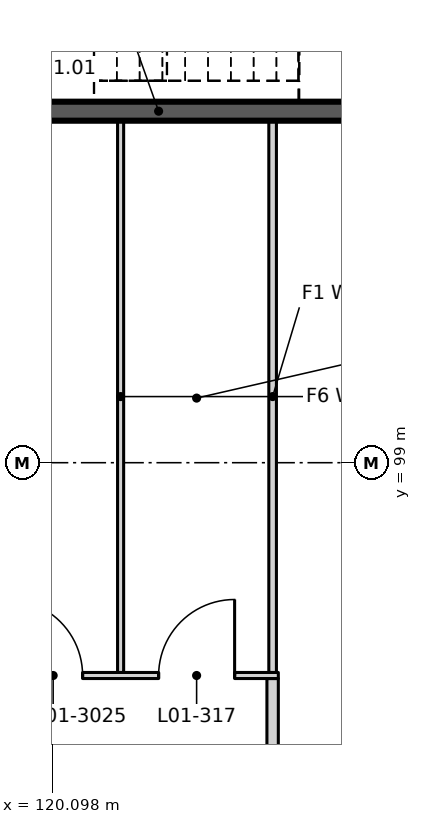
"""IFC4 building model, lengths in metres.
Left out: names, types, materials, properties, quantities, classifications, styles, units other than length and angle.
Written with IfcOpenShell. Run it as: python <this file> out.ifc"""

import sys

from ifc_helpers import new_model, si_unit, direction, frame, frame_2d, origin, place, context, subcontext, project, spatial, rectangle, extrude, element, fill, save


model = new_model("IFC4")
c1 = context("Model", 3, precision=1e-05, world=origin(), true_north=direction((0.0, 1.0)))
c2 = subcontext(c1, "Body", "Model", "MODEL_VIEW")
j1 = project(units=[si_unit("LENGTHUNIT", "METRE"), si_unit("PLANEANGLEUNIT", "RADIAN")], contexts=[c1])
p1 = place(None, origin())
s1 = spatial("IfcSite", under=j1, at=p1, CompositionType="ELEMENT")
p2 = place(p1, origin())
s2 = spatial("IfcBuilding", under=s1, at=p2, CompositionType="ELEMENT")
p3 = place(p2, frame((0.0, 0.0, 6.0)))
s3 = spatial("IfcBuildingStorey", under=s2, at=p3, CompositionType="ELEMENT", Elevation=6.0)
p4 = place(p3, frame((117.0, 103.625, 0.0), z_axis=(0.0, 0.0, 1.0), x_axis=(1.0, 0.0, 0.0)))
e1 = element("IfcWall", 1, at=p4, inside=s3, PredefinedType="SHEAR", context=c2, shape_type="SweptSolid", body=[
    extrude(rectangle(XDim=9.0, YDim=0.25, at=frame_2d((4.5, 0.0))), origin(), (0.0, 0.0, 1.0), 4.2),
])
p5 = place(p3, frame((123.0, 54.15, 0.0), z_axis=(0.0, 0.0, 1.0), x_axis=(0.0, 1.0, 0.0)))
e2 = element("IfcWall", 2, at=p5, inside=s3, PredefinedType="PARTITIONING", context=c2, shape_type="SweptSolid", body=[
    extrude(rectangle(XDim=42.01, YDim=0.15, at=frame_2d((21.005, 0.0))), origin(), (0.0, 0.0, 1.0), 3.65),
])
p6 = place(p5, frame((3.45, 0.0, 0.0)))
e3 = element("IfcOpeningElement", 3, at=p6, cuts=e2, PredefinedType="OPENING", context=c2, shape_type="SweptSolid", body=[
    extrude(rectangle(XDim=1.8, YDim=2.1, at=frame_2d((0.9, 1.05))), frame((0.0, 0.085, 0.0), z_axis=(0.0, -1.0, 0.0), x_axis=(1.0, 0.0, 0.0)), (0.0, 0.0, 1.0), 0.17),
])
p7 = place(p5, frame((12.45, 0.0, 0.0)))
e4 = element("IfcOpeningElement", 4, at=p7, cuts=e2, PredefinedType="OPENING", context=c2, shape_type="SweptSolid", body=[
    extrude(rectangle(XDim=1.8, YDim=2.1, at=frame_2d((0.9, 1.05))), frame((0.0, 0.085, 0.0), z_axis=(0.0, -1.0, 0.0), x_axis=(1.0, 0.0, 0.0)), (0.0, 0.0, 1.0), 0.17),
])
p8 = place(p5, frame((21.45, 0.0, 0.0)))
e5 = element("IfcOpeningElement", 5, at=p8, cuts=e2, PredefinedType="OPENING", context=c2, shape_type="SweptSolid", body=[
    extrude(rectangle(XDim=1.8, YDim=2.1, at=frame_2d((0.9, 1.05))), frame((0.0, 0.085, 0.0), z_axis=(0.0, -1.0, 0.0), x_axis=(1.0, 0.0, 0.0)), (0.0, 0.0, 1.0), 0.17),
])
p9 = place(p5, frame((30.45, 0.0, 0.0)))
e6 = element("IfcOpeningElement", 6, at=p9, cuts=e2, PredefinedType="OPENING", context=c2, shape_type="SweptSolid", body=[
    extrude(rectangle(XDim=1.8, YDim=2.1, at=frame_2d((0.9, 1.05))), frame((0.0, 0.085, 0.0), z_axis=(0.0, -1.0, 0.0), x_axis=(1.0, 0.0, 0.0)), (0.0, 0.0, 1.0), 0.17),
])
p10 = place(p5, frame((38.05, 0.0, 0.0)))
e7 = element("IfcOpeningElement", 7, at=p10, cuts=e2, PredefinedType="OPENING", context=c2, shape_type="SweptSolid", body=[
    extrude(rectangle(XDim=1.8, YDim=2.1, at=frame_2d((0.9, 1.05))), frame((0.0, 0.085, 0.0), z_axis=(0.0, -1.0, 0.0), x_axis=(1.0, 0.0, 0.0)), (0.0, 0.0, 1.0), 0.17),
])
p11 = place(p3, frame((117.15, 96.2, 0.0), z_axis=(0.0, 0.0, 1.0), x_axis=(1.0, 0.0, 0.0)))
e8 = element("IfcWall", 8, at=p11, inside=s3, PredefinedType="PARTITIONING", context=c2, shape_type="SweptSolid", body=[
    extrude(rectangle(XDim=5.925, YDim=0.08, at=frame_2d((2.962, 0.0))), origin(), (0.0, 0.0, 1.0), 3.65),
])
p12 = place(p11, frame((0.35, 0.0, 0.0)))
e9 = element("IfcOpeningElement", 9, at=p12, cuts=e8, PredefinedType="OPENING", context=c2, shape_type="SweptSolid", body=[
    extrude(rectangle(XDim=1.0, YDim=2.1, at=frame_2d((0.5, 1.05))), frame((0.0, 0.05, 0.0), z_axis=(0.0, -1.0, 0.0), x_axis=(1.0, 0.0, 0.0)), (0.0, 0.0, 1.0), 0.1),
])
p13 = place(p11, frame((2.35, 0.0, 0.0)))
e10 = element("IfcOpeningElement", 10, at=p13, cuts=e8, PredefinedType="OPENING", context=c2, shape_type="SweptSolid", body=[
    extrude(rectangle(XDim=1.0, YDim=2.1, at=frame_2d((0.5, 1.05))), frame((0.0, 0.05, 0.0), z_axis=(0.0, -1.0, 0.0), x_axis=(1.0, 0.0, 0.0)), (0.0, 0.0, 1.0), 0.1),
])
p14 = place(p11, frame((4.35, 0.0, 0.0)))
e11 = element("IfcOpeningElement", 11, at=p14, cuts=e8, PredefinedType="OPENING", context=c2, shape_type="SweptSolid", body=[
    extrude(rectangle(XDim=1.0, YDim=2.1, at=frame_2d((0.5, 1.05))), frame((0.0, 0.05, 0.0), z_axis=(0.0, -1.0, 0.0), x_axis=(1.0, 0.0, 0.0)), (0.0, 0.0, 1.0), 0.1),
])
p15 = place(p3, frame((121.0, 96.24, 0.0), z_axis=(0.0, 0.0, 1.0), x_axis=(0.0, 1.0, 0.0)))
e12 = element("IfcWall", 12, at=p15, inside=s3, PredefinedType="PARTITIONING", context=c2, shape_type="SweptSolid", body=[
    extrude(rectangle(XDim=7.26, YDim=0.08, at=frame_2d((3.63, 0.0))), origin(), (0.0, 0.0, 1.0), 4.15),
])
p16 = place(p3, frame((123.0, 96.24, 0.0), z_axis=(0.0, 0.0, 1.0), x_axis=(0.0, 1.0, 0.0)))
e13 = element("IfcWall", 13, at=p16, inside=s3, PredefinedType="PARTITIONING", context=c2, shape_type="SweptSolid", body=[
    extrude(rectangle(XDim=7.26, YDim=0.1, at=frame_2d((3.63, 0.0))), origin(), (0.0, 0.0, 1.0), 4.15),
])
p17 = place(p13, origin())
e14 = element("IfcDoor", 14, at=p17, inside=s3, OperationType="SINGLE_SWING_LEFT", PredefinedType="DOOR", context=c2, shape_type="SweptSolid", body=[
    extrude(rectangle(XDim=1.0, YDim=2.1, at=frame_2d((0.5, 1.05))), frame((0.0, 0.025, 0.0), z_axis=(0.0, -1.0, 0.0), x_axis=(1.0, 0.0, 0.0)), (0.0, 0.0, 1.0), 0.05),
])
fill(e10, e14)
p18 = place(p14, origin())
e15 = element("IfcDoor", 15, at=p18, inside=s3, OperationType="SINGLE_SWING_RIGHT", PredefinedType="DOOR", context=c2, shape_type="SweptSolid", body=[
    extrude(rectangle(XDim=1.0, YDim=2.1, at=frame_2d((0.5, 1.05))), frame((0.0, 0.025, 0.0), z_axis=(0.0, -1.0, 0.0), x_axis=(1.0, 0.0, 0.0)), (0.0, 0.0, 1.0), 0.05),
])
fill(e11, e15)
save(model, sys.argv[1])
